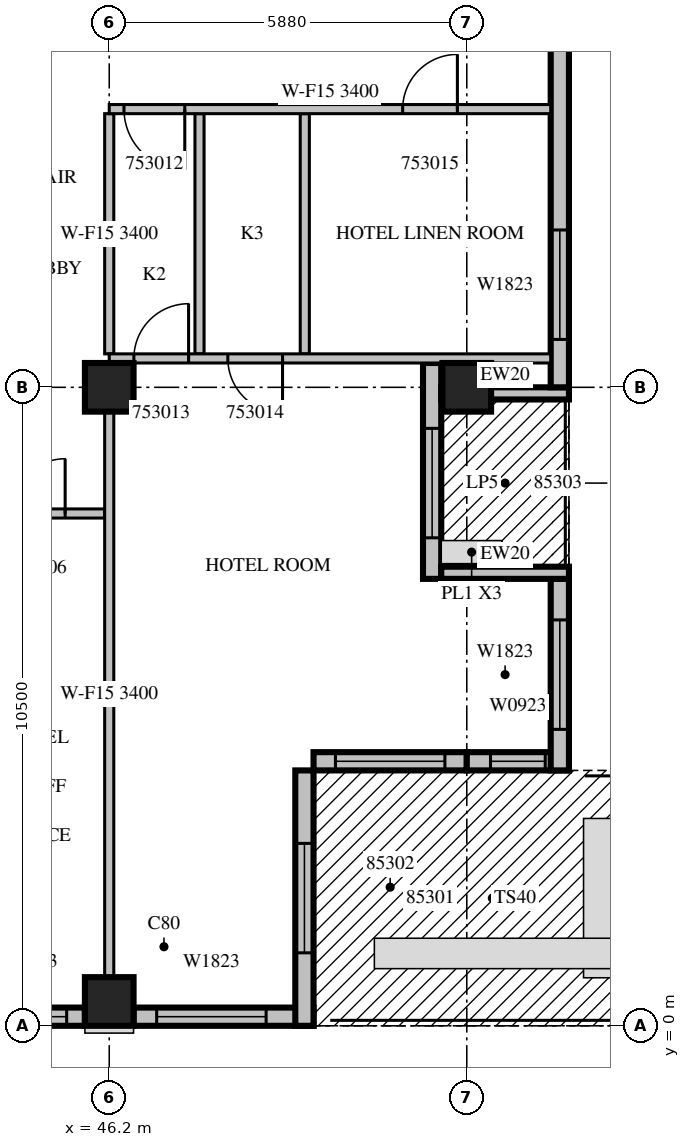
"""IFC4 building model, lengths in metres.
Left out: names, types, materials, properties, quantities, classifications, styles, units other than length and angle.
Written with IfcOpenShell. Run it as: python <this file> out.ifc"""

import sys

from ifc_helpers import new_model, si_unit, direction, frame, frame_2d, origin, origin_2d, place, context, subcontext, project, spatial, rectangle, extrude, source, transform, mapped, element, fill, save


model = new_model("IFC4")
c1 = context("Model", 3, precision=1e-05, world=origin(), true_north=direction((0.0, 1.0)))
c2 = subcontext(c1, "Body", "Model", "MODEL_VIEW")
j1 = project(units=[si_unit("LENGTHUNIT", "METRE"), si_unit("PLANEANGLEUNIT", "RADIAN")], contexts=[c1])
p1 = place(None, origin())
s1 = spatial("IfcSite", under=j1, at=p1, CompositionType="ELEMENT")
p2 = place(p1, origin())
s2 = spatial("IfcBuilding", under=s1, at=p2, CompositionType="ELEMENT")
p3 = place(p2, frame((0.0, 0.0, 234.8)))
s3 = spatial("IfcBuildingStorey", under=s2, at=p3, CompositionType="ELEMENT", Elevation=234.8)
m1 = source(origin(), c2, "Body", "SweptSolid", [
    extrude(rectangle(XDim=0.8, YDim=0.8, at=origin_2d()), origin(), (0.0, 0.0, 1.0), 3.8),
])
for number, where, z_axis, x_axis in (
    (1, (46.2, 0.4, 0.0), (0.0, 0.0, 1.0), (1.0, 0.0, 0.0)),
    (2, (46.2, 10.5, 0.0), (0.0, 0.0, 1.0), (1.0, 0.0, 0.0)),
    (3, (52.08, 10.5, 0.0), (0.0, 0.0, 1.0), (1.0, 0.0, 0.0)),
):
    element("IfcColumn", number, at=place(p3, frame(where, z_axis=z_axis, x_axis=x_axis)), inside=s3, PredefinedType="COLUMN", context=c2, shape_type="MappedRepresentation", body=[
        mapped(m1, transform((0.0, 0.0, 0.0), scale=1.0)),
    ])
m2 = source(origin(), c2, "Body", "SweptSolid", [
    extrude(rectangle(XDim=1.8, YDim=0.3, at=frame_2d((0.9, 0.0))), origin(), (0.0, 0.0, 1.0), 3.4),
])
p4 = place(p3, frame((44.0, 0.15, 0.0), z_axis=(0.0, 0.0, 1.0), x_axis=(1.0, 0.0, 0.0)))
e4 = element("IfcWall", 4, at=p4, inside=s3, PredefinedType="STANDARD", context=c2, shape_type="MappedRepresentation", body=[
    mapped(m2, transform((0.0, 0.0, 0.0), scale=1.0)),
])
m3 = source(origin(), c2, "Body", "SweptSolid", [
    extrude(rectangle(XDim=1.2, YDim=2.3, at=frame_2d((0.6, 1.15))), frame((0.0, 0.16, 0.0), z_axis=(0.0, -1.0, 0.0), x_axis=(1.0, 0.0, 0.0)), (0.0, 0.0, 1.0), 0.32),
])
p5 = place(p4, frame((0.3, 0.0, 0.6)))
e5 = element("IfcOpeningElement", 5, at=p5, cuts=e4, PredefinedType="OPENING", context=c2, shape_type="MappedRepresentation", body=[
    mapped(m3, transform((0.0, 0.0, 0.0), scale=1.0)),
])
m4 = source(origin(), c2, "Body", "SweptSolid", [
    extrude(rectangle(XDim=2.96, YDim=0.3, at=frame_2d((1.48, 0.0))), origin(), (0.0, 0.0, 1.0), 3.4),
])
p6 = place(p3, frame((46.6, 0.15, 0.0), z_axis=(0.0, 0.0, 1.0), x_axis=(1.0, 0.0, 0.0)))
e6 = element("IfcWall", 6, at=p6, inside=s3, PredefinedType="STANDARD", context=c2, shape_type="MappedRepresentation", body=[
    mapped(m4, transform((0.0, 0.0, 0.0), scale=1.0)),
])
m5 = source(origin(), c2, "Body", "SweptSolid", [
    extrude(rectangle(XDim=1.8, YDim=2.3, at=frame_2d((0.9, 1.15))), frame((0.0, 0.16, 0.0), z_axis=(0.0, -1.0, 0.0), x_axis=(1.0, 0.0, 0.0)), (0.0, 0.0, 1.0), 0.32),
])
p7 = place(p6, frame((0.38, 0.0, 0.6)))
e7 = element("IfcOpeningElement", 7, at=p7, cuts=e6, PredefinedType="OPENING", context=c2, shape_type="MappedRepresentation", body=[
    mapped(m5, transform((0.0, 0.0, 0.0), scale=1.0)),
])
m6 = source(origin(), c2, "Body", "SweptSolid", [
    extrude(rectangle(XDim=4.2, YDim=0.3, at=frame_2d((2.1, 0.0))), origin(), (0.0, 0.0, 1.0), 3.4),
])
p8 = place(p3, frame((49.41, 0.0, 0.0), z_axis=(0.0, 0.0, 1.0), x_axis=(0.0, 1.0, 0.0)))
e8 = element("IfcWall", 8, at=p8, inside=s3, PredefinedType="STANDARD", context=c2, shape_type="MappedRepresentation", body=[
    mapped(m6, transform((0.0, 0.0, 0.0), scale=1.0)),
])
m7 = source(origin(), c2, "Body", "SweptSolid", [
    extrude(rectangle(XDim=1.8, YDim=2.4, at=frame_2d((0.9, 1.2))), frame((0.0, 0.16, 0.0), z_axis=(0.0, -1.0, 0.0), x_axis=(1.0, 0.0, 0.0)), (0.0, 0.0, 1.0), 0.32),
])
p9 = place(p8, frame((1.2, 0.0, 0.0)))
e9 = element("IfcOpeningElement", 9, at=p9, cuts=e8, PredefinedType="OPENING", context=c2, shape_type="MappedRepresentation", body=[
    mapped(m7, transform((0.0, 0.0, 0.0), scale=1.0)),
])
m8 = source(origin(), c2, "Body", "SweptSolid", [
    extrude(rectangle(XDim=2.52, YDim=0.3, at=frame_2d((1.26, 0.0))), origin(), (0.0, 0.0, 1.0), 3.4),
])
p10 = place(p3, frame((49.56, 4.35, 0.0), z_axis=(0.0, 0.0, 1.0), x_axis=(1.0, 0.0, 0.0)))
e10 = element("IfcWall", 10, at=p10, inside=s3, PredefinedType="STANDARD", context=c2, shape_type="MappedRepresentation", body=[
    mapped(m8, transform((0.0, 0.0, 0.0), scale=1.0)),
])
p11 = place(p10, frame((0.36, 0.0, 0.0)))
e11 = element("IfcOpeningElement", 11, at=p11, cuts=e10, PredefinedType="OPENING", context=c2, shape_type="MappedRepresentation", body=[
    mapped(m7, transform((0.0, 0.0, 0.0), scale=1.0)),
])
m9 = source(origin(), c2, "Body", "SweptSolid", [
    extrude(rectangle(XDim=1.68, YDim=0.3, at=frame_2d((0.84, 0.0))), origin(), (0.0, 0.0, 1.0), 3.4),
])
p12 = place(p3, frame((52.08, 4.35, 0.0), z_axis=(0.0, 0.0, 1.0), x_axis=(1.0, 0.0, 0.0)))
e12 = element("IfcWall", 12, at=p12, inside=s3, PredefinedType="STANDARD", context=c2, shape_type="MappedRepresentation", body=[
    mapped(m9, transform((0.0, 0.0, 0.0), scale=1.0)),
])
m10 = source(origin(), c2, "Body", "SweptSolid", [
    extrude(rectangle(XDim=0.9, YDim=2.3, at=frame_2d((0.45, 1.15))), frame((0.0, 0.16, 0.0), z_axis=(0.0, -1.0, 0.0), x_axis=(1.0, 0.0, 0.0)), (0.0, 0.0, 1.0), 0.32),
])
p13 = place(p12, frame((0.39, 0.0, 0.6)))
e13 = element("IfcOpeningElement", 13, at=p13, cuts=e12, PredefinedType="OPENING", context=c2, shape_type="MappedRepresentation", body=[
    mapped(m10, transform((0.0, 0.0, 0.0), scale=1.0)),
])
m11 = source(origin(), c2, "Body", "SweptSolid", [
    extrude(rectangle(XDim=3.15, YDim=0.3, at=frame_2d((1.575, 0.0))), origin(), (0.0, 0.0, 1.0), 3.4),
])
p14 = place(p3, frame((53.61, 4.2, 0.0), z_axis=(0.0, 0.0, 1.0), x_axis=(0.0, 1.0, 0.0)))
e14 = element("IfcWall", 14, at=p14, inside=s3, PredefinedType="STANDARD", context=c2, shape_type="MappedRepresentation", body=[
    mapped(m11, transform((0.0, 0.0, 0.0), scale=1.0)),
])
p15 = place(p14, frame((0.675, 0.0, 0.6)))
e15 = element("IfcOpeningElement", 15, at=p15, cuts=e14, PredefinedType="OPENING", context=c2, shape_type="MappedRepresentation", body=[
    mapped(m5, transform((0.0, 0.0, 0.0), scale=1.0)),
])
p16 = place(p3, frame((51.51, 7.35, 0.0), z_axis=(0.0, 0.0, 1.0), x_axis=(0.0, 1.0, 0.0)))
e16 = element("IfcWall", 16, at=p16, inside=s3, PredefinedType="STANDARD", context=c2, shape_type="SweptSolid", body=[
    extrude(rectangle(XDim=3.55, YDim=0.3, at=frame_2d((1.775, 0.0))), origin(), (0.0, 0.0, 1.0), 3.4),
])
p17 = place(p16, frame((0.675, 0.0, 0.0)))
e17 = element("IfcOpeningElement", 17, at=p17, cuts=e16, PredefinedType="OPENING", context=c2, shape_type="MappedRepresentation", body=[
    mapped(m7, transform((0.0, 0.0, 0.0), scale=1.0)),
])
m12 = source(origin(), c2, "Body", "SweptSolid", [
    extrude(rectangle(XDim=2.1, YDim=0.2, at=frame_2d((1.05, 0.0))), origin(), (0.0, 0.0, 1.0), 3.4),
])
for number, where, z_axis, x_axis in (
    (18, (53.76, 7.45, 0.0), (0.0, 0.0, 1.0), (-1.0, 0.0, 0.0)),
    (19, (53.76, 10.4, 0.0), (0.0, 0.0, 1.0), (-1.0, 0.0, 0.0)),
):
    element("IfcWall", number, at=place(p3, frame(where, z_axis=z_axis, x_axis=x_axis)), inside=s3, PredefinedType="STANDARD", context=c2, shape_type="MappedRepresentation", body=[
        mapped(m12, transform((0.0, 0.0, 0.0), scale=1.0)),
    ])
m13 = source(origin(), c2, "Body", "SweptSolid", [
    extrude(rectangle(XDim=6.75, YDim=0.3, at=frame_2d((3.375, 0.0))), origin(), (0.0, 0.0, 1.0), 3.4),
])
p18 = place(p3, frame((53.61, 10.5, 0.0), z_axis=(0.0, 0.0, 1.0), x_axis=(0.0, 1.0, 0.0)))
e20 = element("IfcWall", 20, at=p18, inside=s3, PredefinedType="STANDARD", context=c2, shape_type="MappedRepresentation", body=[
    mapped(m13, transform((0.0, 0.0, 0.0), scale=1.0)),
])
p19 = place(p18, frame((0.787, 0.0, 0.6)))
e21 = element("IfcOpeningElement", 21, at=p19, cuts=e20, PredefinedType="OPENING", context=c2, shape_type="MappedRepresentation", body=[
    mapped(m5, transform((0.0, 0.0, 0.0), scale=1.0)),
])
m14 = source(origin(), c2, "Body", "SweptSolid", [
    extrude(rectangle(XDim=2.2, YDim=0.15, at=frame_2d((1.1, 0.0))), origin(), (0.0, 0.0, 1.0), 3.4),
])
p20 = place(p3, frame((46.125, 8.425, 0.0), z_axis=(0.0, 0.0, 1.0), x_axis=(-1.0, 0.0, 0.0)))
e22 = element("IfcWall", 22, at=p20, inside=s3, PredefinedType="PARTITIONING", context=c2, shape_type="MappedRepresentation", body=[
    mapped(m14, transform((0.0, 0.0, 0.0), scale=1.0)),
])
m15 = source(origin(), c2, "Body", "SweptSolid", [
    extrude(rectangle(XDim=0.9, YDim=2.1, at=frame_2d((0.45, 1.05))), frame((0.0, 0.085, 0.0), z_axis=(0.0, -1.0, 0.0), x_axis=(1.0, 0.0, 0.0)), (0.0, 0.0, 1.0), 0.17),
])
p21 = place(p20, frame((0.65, 0.0, 0.0)))
e23 = element("IfcOpeningElement", 23, at=p21, cuts=e22, PredefinedType="OPENING", context=c2, shape_type="MappedRepresentation", body=[
    mapped(m15, transform((0.0, 0.0, 0.0), scale=1.0)),
])
m16 = source(origin(), c2, "Body", "SweptSolid", [
    extrude(rectangle(XDim=3.95, YDim=0.15, at=frame_2d((1.975, 0.0))), origin(), (0.0, 0.0, 1.0), 3.4),
])
for number, where, z_axis, x_axis in (
    (24, (47.684, 11.05, 0.0), (0.0, 0.0, 1.0), (0.0, 1.0, 0.0)),
    (25, (49.416, 11.05, 0.0), (0.0, 0.0, 1.0), (0.0, 1.0, 0.0)),
):
    element("IfcWall", number, at=place(p3, frame(where, z_axis=z_axis, x_axis=x_axis)), inside=s3, PredefinedType="PARTITIONING", context=c2, shape_type="MappedRepresentation", body=[
        mapped(m16, transform((0.0, 0.0, 0.0), scale=1.0)),
    ])
m17 = source(origin(), c2, "Body", "SweptSolid", [
    extrude(rectangle(XDim=9.302, YDim=0.15, at=frame_2d((4.651, 0.0))), origin(), (0.0, 0.0, 1.0), 3.4),
])
p22 = place(p3, frame((46.2, 0.799, 0.0), z_axis=(0.0, 0.0, 1.0), x_axis=(0.0, 1.0, 0.0)))
e26 = element("IfcWall", 26, at=p22, inside=s3, PredefinedType="PARTITIONING", context=c2, shape_type="MappedRepresentation", body=[
    mapped(m17, transform((0.0, 0.0, 0.0), scale=1.0)),
])
p23 = place(p3, frame((46.2, 11.05, 0.0), z_axis=(0.0, 0.0, 1.0), x_axis=(0.0, 1.0, 0.0)))
e27 = element("IfcWall", 27, at=p23, inside=s3, PredefinedType="PARTITIONING", context=c2, shape_type="MappedRepresentation", body=[
    mapped(m16, transform((0.0, 0.0, 0.0), scale=1.0)),
])
m18 = source(origin(), c2, "Body", "SweptSolid", [
    extrude(rectangle(XDim=7.26, YDim=0.15, at=frame_2d((3.63, 0.0))), origin(), (0.0, 0.0, 1.0), 3.4),
])
p24 = place(p3, frame((53.46, 10.975, 0.0), z_axis=(0.0, 0.0, 1.0), x_axis=(-1.0, 0.0, 0.0)))
e28 = element("IfcWall", 28, at=p24, inside=s3, PredefinedType="PARTITIONING", context=c2, shape_type="MappedRepresentation", body=[
    mapped(m18, transform((0.0, 0.0, 0.0), scale=1.0)),
])
p25 = place(p24, frame((5.955, 0.0, 0.0)))
e29 = element("IfcOpeningElement", 29, at=p25, cuts=e28, PredefinedType="OPENING", context=c2, shape_type="MappedRepresentation", body=[
    mapped(m15, transform((0.0, 0.0, 0.0), scale=1.0)),
])
p26 = place(p24, frame((4.41, 0.0, 0.0)))
e30 = element("IfcOpeningElement", 30, at=p26, cuts=e28, PredefinedType="OPENING", context=c2, shape_type="MappedRepresentation", body=[
    mapped(m15, transform((0.0, 0.0, 0.0), scale=1.0)),
])
p27 = place(p3, frame((53.46, 15.075, 0.0), z_axis=(0.0, 0.0, 1.0), x_axis=(-1.0, 0.0, 0.0)))
e31 = element("IfcWall", 31, at=p27, inside=s3, PredefinedType="PARTITIONING", context=c2, shape_type="MappedRepresentation", body=[
    mapped(m18, transform((0.0, 0.0, 0.0), scale=1.0)),
])
m19 = source(origin(), c2, "Body", "SweptSolid", [
    extrude(rectangle(XDim=1.0, YDim=2.1, at=frame_2d((0.5, 1.05))), frame((0.0, 0.085, 0.0), z_axis=(0.0, -1.0, 0.0), x_axis=(1.0, 0.0, 0.0)), (0.0, 0.0, 1.0), 0.17),
])
p28 = place(p27, frame((6.018, 0.0, 0.0)))
e32 = element("IfcOpeningElement", 32, at=p28, cuts=e31, PredefinedType="OPENING", context=c2, shape_type="MappedRepresentation", body=[
    mapped(m19, transform((0.0, 0.0, 0.0), scale=1.0)),
])
p29 = place(p27, frame((1.534, 0.0, 0.0)))
e33 = element("IfcOpeningElement", 33, at=p29, cuts=e31, PredefinedType="OPENING", context=c2, shape_type="MappedRepresentation", body=[
    mapped(m15, transform((0.0, 0.0, 0.0), scale=1.0)),
])
m20 = source(origin(), c2, "Body", "SweptSolid", [
    extrude(rectangle(XDim=1.2, YDim=2.3, at=frame_2d((0.6, 1.15))), frame((0.0, 0.03, 0.0), z_axis=(0.0, -1.0, 0.0), x_axis=(1.0, 0.0, 0.0)), (0.0, 0.0, 1.0), 0.06),
])
p30 = place(p5, origin())
e34 = element("IfcWindow", 34, at=p30, inside=s3, PartitioningType="SINGLE_PANEL", PredefinedType="WINDOW", context=c2, shape_type="MappedRepresentation", body=[
    mapped(m20, transform((0.0, 0.0, 0.0), scale=1.0)),
])
fill(e5, e34)
m21 = source(origin(), c2, "Body", "SweptSolid", [
    extrude(rectangle(XDim=1.8, YDim=2.3, at=frame_2d((0.9, 1.15))), frame((0.0, 0.03, 0.0), z_axis=(0.0, -1.0, 0.0), x_axis=(1.0, 0.0, 0.0)), (0.0, 0.0, 1.0), 0.06),
])
p31 = place(p7, origin())
e35 = element("IfcWindow", 35, at=p31, inside=s3, PartitioningType="SINGLE_PANEL", PredefinedType="WINDOW", context=c2, shape_type="MappedRepresentation", body=[
    mapped(m21, transform((0.0, 0.0, 0.0), scale=1.0)),
])
fill(e7, e35)
m22 = source(origin(), c2, "Body", "SweptSolid", [
    extrude(rectangle(XDim=1.8, YDim=2.4, at=frame_2d((0.9, 1.2))), frame((0.0, 0.025, 0.0), z_axis=(0.0, -1.0, 0.0), x_axis=(1.0, 0.0, 0.0)), (0.0, 0.0, 1.0), 0.05),
])
p32 = place(p9, origin())
e36 = element("IfcDoor", 36, at=p32, inside=s3, OperationType="SLIDING_TO_LEFT", PredefinedType="DOOR", context=c2, shape_type="MappedRepresentation", body=[
    mapped(m22, transform((0.0, 0.0, 0.0), scale=1.0)),
])
fill(e9, e36)
p33 = place(p11, origin())
e37 = element("IfcDoor", 37, at=p33, inside=s3, OperationType="SLIDING_TO_LEFT", PredefinedType="DOOR", context=c2, shape_type="MappedRepresentation", body=[
    mapped(m22, transform((0.0, 0.0, 0.0), scale=1.0)),
])
fill(e11, e37)
m23 = source(origin(), c2, "Body", "SweptSolid", [
    extrude(rectangle(XDim=0.9, YDim=2.3, at=frame_2d((0.45, 1.15))), frame((0.0, 0.03, 0.0), z_axis=(0.0, -1.0, 0.0), x_axis=(1.0, 0.0, 0.0)), (0.0, 0.0, 1.0), 0.06),
])
p34 = place(p13, origin())
e38 = element("IfcWindow", 38, at=p34, inside=s3, PartitioningType="SINGLE_PANEL", PredefinedType="WINDOW", context=c2, shape_type="MappedRepresentation", body=[
    mapped(m23, transform((0.0, 0.0, 0.0), scale=1.0)),
])
fill(e13, e38)
p35 = place(p15, origin())
e39 = element("IfcWindow", 39, at=p35, inside=s3, PartitioningType="SINGLE_PANEL", PredefinedType="WINDOW", context=c2, shape_type="MappedRepresentation", body=[
    mapped(m21, transform((0.0, 0.0, 0.0), scale=1.0)),
])
fill(e15, e39)
p36 = place(p17, origin())
e40 = element("IfcDoor", 40, at=p36, inside=s3, OperationType="SLIDING_TO_LEFT", PredefinedType="DOOR", context=c2, shape_type="MappedRepresentation", body=[
    mapped(m22, transform((0.0, 0.0, 0.0), scale=1.0)),
])
fill(e17, e40)
p37 = place(p19, origin())
e41 = element("IfcWindow", 41, at=p37, inside=s3, PartitioningType="SINGLE_PANEL", PredefinedType="WINDOW", context=c2, shape_type="MappedRepresentation", body=[
    mapped(m21, transform((0.0, 0.0, 0.0), scale=1.0)),
])
fill(e21, e41)
m24 = source(origin(), c2, "Body", "SweptSolid", [
    extrude(rectangle(XDim=0.9, YDim=2.1, at=frame_2d((0.45, 1.05))), frame((0.0, 0.025, 0.0), z_axis=(0.0, -1.0, 0.0), x_axis=(1.0, 0.0, 0.0)), (0.0, 0.0, 1.0), 0.05),
])
p38 = place(p21, origin())
e42 = element("IfcDoor", 42, at=p38, inside=s3, OperationType="SINGLE_SWING_RIGHT", PredefinedType="DOOR", context=c2, shape_type="MappedRepresentation", body=[
    mapped(m24, transform((0.0, 0.0, 0.0), scale=1.0)),
])
fill(e23, e42)
m25 = source(origin(), c2, "Body", "SweptSolid", [
    extrude(rectangle(XDim=1.0, YDim=2.1, at=frame_2d((0.5, 1.05))), frame((0.0, 0.025, 0.0), z_axis=(0.0, -1.0, 0.0), x_axis=(1.0, 0.0, 0.0)), (0.0, 0.0, 1.0), 0.05),
])
p39 = place(p28, origin())
e43 = element("IfcDoor", 43, at=p39, inside=s3, OperationType="SINGLE_SWING_LEFT", PredefinedType="DOOR", context=c2, shape_type="MappedRepresentation", body=[
    mapped(m25, transform((0.0, 0.0, 0.0), scale=1.0)),
])
fill(e32, e43)
p40 = place(p25, origin())
e44 = element("IfcDoor", 44, at=p40, inside=s3, OperationType="SINGLE_SWING_RIGHT", PredefinedType="DOOR", context=c2, shape_type="MappedRepresentation", body=[
    mapped(m24, transform((0.0, 0.0, 0.0), scale=1.0)),
])
fill(e29, e44)
p41 = place(p26, origin())
e45 = element("IfcDoor", 45, at=p41, inside=s3, OperationType="SINGLE_SWING_LEFT", PredefinedType="DOOR", context=c2, shape_type="MappedRepresentation", body=[
    mapped(m24, transform((0.0, 0.0, 0.0), scale=1.0)),
])
fill(e30, e45)
p42 = place(p29, origin())
e46 = element("IfcDoor", 46, at=p42, inside=s3, OperationType="SINGLE_SWING_RIGHT", PredefinedType="DOOR", context=c2, shape_type="MappedRepresentation", body=[
    mapped(m24, transform((0.0, 0.0, 0.0), scale=1.0)),
])
fill(e33, e46)
save(model, sys.argv[1])
